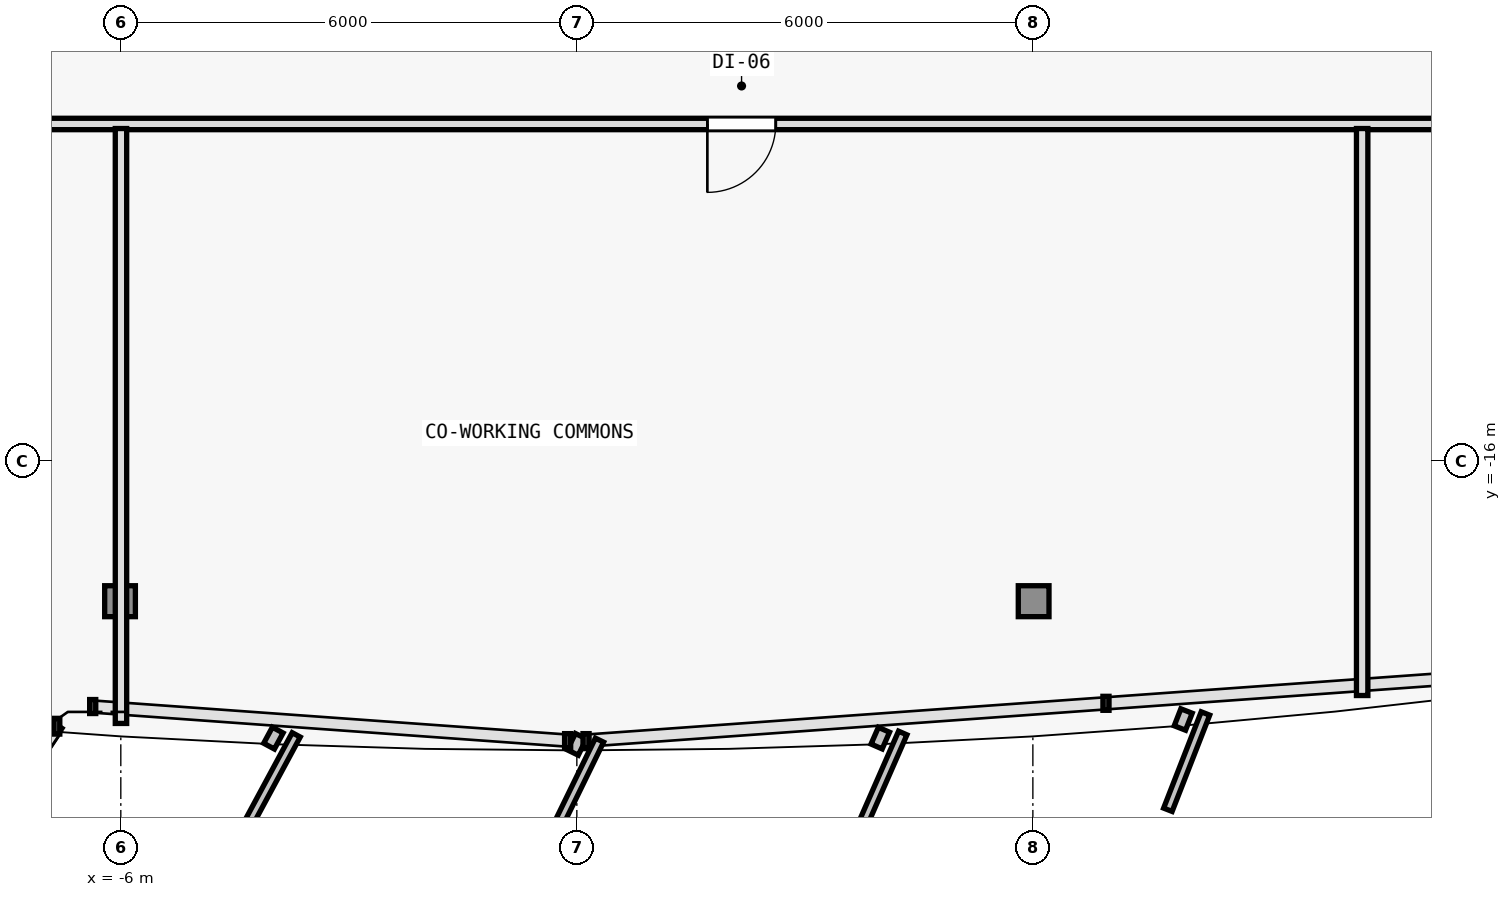
"""IFC4 building model, lengths in metres.
Left out: names, types, materials, properties, quantities, classifications, styles, units other than length and angle.
Written with IfcOpenShell. Run it as: python <this file> out.ifc"""

import sys

from ifc_helpers import new_model, si_unit, direction, frame, frame_2d, origin, origin_2d, place, context, subcontext, project, spatial, rectangle, i_section, extrude, element, fill, save


model = new_model("IFC4")
c1 = context("Model", 3, precision=1e-05, world=origin(), true_north=direction((0.0, 1.0)))
c2 = subcontext(c1, "Body", "Model", "MODEL_VIEW")
j1 = project(units=[si_unit("LENGTHUNIT", "METRE"), si_unit("PLANEANGLEUNIT", "RADIAN")], contexts=[c1])
p1 = place(None, origin())
s1 = spatial("IfcSite", under=j1, at=p1, CompositionType="ELEMENT")
p2 = place(p1, origin())
s2 = spatial("IfcBuilding", under=s1, at=p2, CompositionType="ELEMENT")
p3 = place(p2, frame((0.0, 0.0, 149.4)))
s3 = spatial("IfcBuildingStorey", under=s2, at=p3, CompositionType="ELEMENT", Elevation=149.4)
for number, where, z_axis, x_axis in (
    (1, (-6.01, -17.838, 0.006), (0.007, 0.035, 0.999), (-0.981, 0.193, 0.0)),
    (2, (6.01, -17.838, 0.006), (-0.007, 0.035, 0.999), (-0.981, -0.193, 0.0)),
):
    element("IfcColumn", number, at=place(p3, frame(where, z_axis=z_axis, x_axis=x_axis)), inside=s3, PredefinedType="COLUMN", context=c2, shape_type="SweptSolid", body=[
        extrude(i_section(OverallWidth=0.404, OverallDepth=0.407, WebThickness=0.017, FlangeThickness=0.028, FilletRadius=0.015, at=origin_2d()), origin(), (0.0, 0.0, 1.0), 3.591),
    ])
p4 = place(p3, frame((13.18, -11.56, 0.0), z_axis=(0.0, 0.0, 1.0), x_axis=(-1.0, 0.0, 0.0)))
e3 = element("IfcWall", 3, at=p4, inside=s3, PredefinedType="PARTITIONING", context=c2, shape_type="SweptSolid", body=[
    extrude(rectangle(XDim=23.04, YDim=0.15, at=frame_2d((11.52, 0.0))), origin(), (0.0, 0.0, 1.0), 2.775),
])
p5 = place(p4, frame((20.57, 0.0, 0.0)))
e4 = element("IfcOpeningElement", 4, at=p5, cuts=e3, PredefinedType="OPENING", context=c2, shape_type="SweptSolid", body=[
    extrude(rectangle(XDim=0.9, YDim=2.1, at=frame_2d((0.45, 1.05))), frame((0.0, 0.085, 0.0), z_axis=(0.0, -1.0, 0.0), x_axis=(1.0, 0.0, 0.0)), (0.0, 0.0, 1.0), 0.17),
])
p6 = place(p4, frame((10.563, 0.0, 0.0)))
e5 = element("IfcOpeningElement", 5, at=p6, cuts=e3, PredefinedType="OPENING", context=c2, shape_type="SweptSolid", body=[
    extrude(rectangle(XDim=0.9, YDim=2.1, at=frame_2d((0.45, 1.05))), frame((0.0, 0.085, 0.0), z_axis=(0.0, -1.0, 0.0), x_axis=(1.0, 0.0, 0.0)), (0.0, 0.0, 1.0), 0.17),
])
p7 = place(p3, frame((-5.998, -11.62, 0.0), z_axis=(0.0, 0.0, 1.0), x_axis=(0.0, -1.0, 0.0)))
e6 = element("IfcWall", 6, at=p7, inside=s3, PredefinedType="PARTITIONING", context=c2, shape_type="SweptSolid", body=[
    extrude(rectangle(XDim=7.827, YDim=0.15, at=frame_2d((3.913, 0.0))), origin(), (0.0, 0.0, 1.0), 2.775),
])
p8 = place(p3, frame((10.333, -11.62, 0.0), z_axis=(0.0, 0.0, 1.0), x_axis=(0.0, -1.0, 0.0)))
e7 = element("IfcWall", 7, at=p8, inside=s3, PredefinedType="PARTITIONING", context=c2, shape_type="SweptSolid", body=[
    extrude(rectangle(XDim=7.459, YDim=0.15, at=frame_2d((3.729, 0.0))), origin(), (0.0, 0.0, 1.0), 2.885),
])
p9 = place(p6, origin())
e8 = element("IfcDoor", 8, at=p9, inside=s3, OperationType="SINGLE_SWING_RIGHT", PredefinedType="DOOR", context=c2, shape_type="SweptSolid", body=[
    extrude(rectangle(XDim=0.9, YDim=2.1, at=frame_2d((0.45, 1.05))), frame((0.0, 0.025, 0.0), z_axis=(0.0, -1.0, 0.0), x_axis=(1.0, 0.0, 0.0)), (0.0, 0.0, 1.0), 0.05),
])
fill(e5, e8)
save(model, sys.argv[1])
